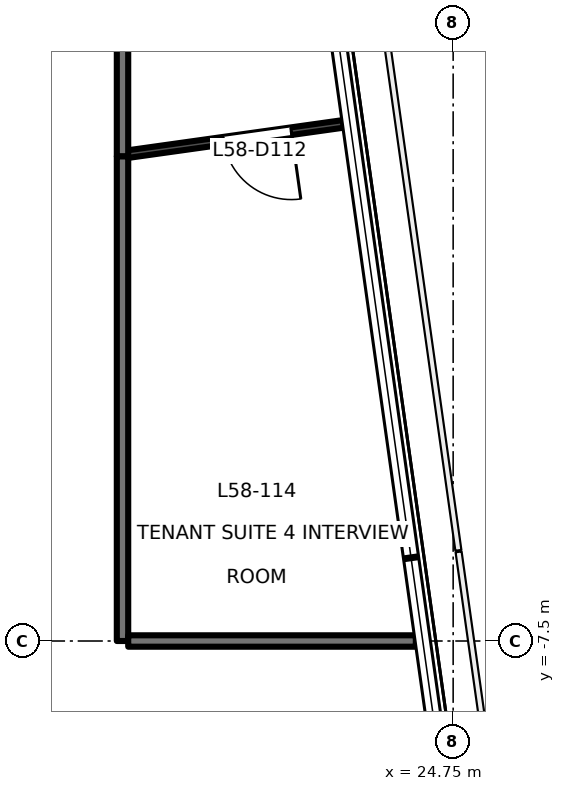
"""IFC4 building model, lengths in metres.
Left out: names, types, materials, properties, quantities, classifications, styles, units other than length and angle.
Written with IfcOpenShell. Run it as: python <this file> out.ifc"""

import sys

from ifc_helpers import new_model, si_unit, direction, frame, frame_2d, origin, place, context, subcontext, project, spatial, rectangle, extrude, element, fill, save


model = new_model("IFC4")
c1 = context("Model", 3, precision=1e-05, world=origin(), true_north=direction((0.0, 1.0)))
c2 = subcontext(c1, "Body", "Model", "MODEL_VIEW")
j1 = project(units=[si_unit("LENGTHUNIT", "METRE"), si_unit("PLANEANGLEUNIT", "RADIAN")], contexts=[c1])
p1 = place(None, origin())
s1 = spatial("IfcSite", under=j1, at=p1, CompositionType="ELEMENT")
p2 = place(p1, origin())
s2 = spatial("IfcBuilding", under=s1, at=p2, CompositionType="ELEMENT")
p3 = place(p2, frame((0.0, 0.0, 255.1)))
s3 = spatial("IfcBuildingStorey", under=s2, at=p3, CompositionType="ELEMENT", Elevation=255.1)
p4 = place(p3, frame((20.4, 5.5, 0.0), z_axis=(0.0, 0.0, 1.0), x_axis=(0.0, -1.0, 0.0)))
e1 = element("IfcWall", 1, at=p4, inside=s3, PredefinedType="PARTITIONING", context=c2, shape_type="SweptSolid", body=[
    extrude(rectangle(XDim=6.625, YDim=0.15, at=frame_2d((3.312, 0.0))), origin(), (0.0, 0.0, 1.0), 3.4),
])
p5 = place(p4, frame((2.562, 0.0, 0.0)))
e2 = element("IfcOpeningElement", 2, at=p5, cuts=e1, PredefinedType="OPENING", context=c2, shape_type="SweptSolid", body=[
    extrude(rectangle(XDim=1.5, YDim=2.1, at=frame_2d((0.75, 1.05))), frame((0.0, 0.085, 0.0), z_axis=(0.0, -1.0, 0.0), x_axis=(1.0, 0.0, 0.0)), (0.0, 0.0, 1.0), 0.171),
])
p6 = place(p3, frame((20.4, -1.125, 0.0), z_axis=(0.0, 0.0, 1.0), x_axis=(0.0, -1.0, 0.0)))
e3 = element("IfcWall", 3, at=p6, inside=s3, PredefinedType="PARTITIONING", context=c2, shape_type="SweptSolid", body=[
    extrude(rectangle(XDim=6.375, YDim=0.15, at=frame_2d((3.188, 0.0))), origin(), (0.0, 0.0, 1.0), 3.4),
])
p7 = place(p3, frame((20.475, -7.5, 0.0), z_axis=(0.0, 0.0, 1.0), x_axis=(1.0, 0.0, 0.0)))
e4 = element("IfcWall", 4, at=p7, inside=s3, PredefinedType="PARTITIONING", context=c2, shape_type="SweptSolid", body=[
    extrude(rectangle(XDim=3.784, YDim=0.15, at=frame_2d((1.892, 0.0))), origin(), (0.0, 0.0, 1.0), 3.7),
])
p8 = place(p3, frame((23.303, -0.697, 0.0), z_axis=(0.0, 0.0, 1.0), x_axis=(-0.990291093887, -0.139009170086, 0.0)))
e5 = element("IfcWall", 5, at=p8, inside=s3, PredefinedType="PARTITIONING", context=c2, shape_type="SweptSolid", body=[
    extrude(rectangle(XDim=2.863, YDim=0.1, at=frame_2d((1.431, 0.0))), origin(), (0.0, 0.0, 1.0), 3.7),
])
p9 = place(p8, frame((0.689, 0.0, 0.0)))
e6 = element("IfcOpeningElement", 6, at=p9, cuts=e5, PredefinedType="OPENING", context=c2, shape_type="SweptSolid", body=[
    extrude(rectangle(XDim=0.9, YDim=2.1, at=frame_2d((0.45, 1.05))), frame((0.0, 0.061, 0.0), z_axis=(0.0, -1.0, 0.0), x_axis=(1.0, 0.0, 0.0)), (0.0, 0.0, 1.0), 0.121),
])
p10 = place(p9, origin())
e7 = element("IfcDoor", 7, at=p10, inside=s3, OperationType="SINGLE_SWING_LEFT", PredefinedType="DOOR", context=c2, shape_type="SweptSolid", body=[
    extrude(rectangle(XDim=0.9, YDim=2.1, at=frame_2d((0.45, 1.05))), frame((0.0, 0.025, 0.0), z_axis=(0.0, -1.0, 0.0), x_axis=(1.0, 0.0, 0.0)), (0.0, 0.0, 1.0), 0.05),
])
fill(e6, e7)
save(model, sys.argv[1])
